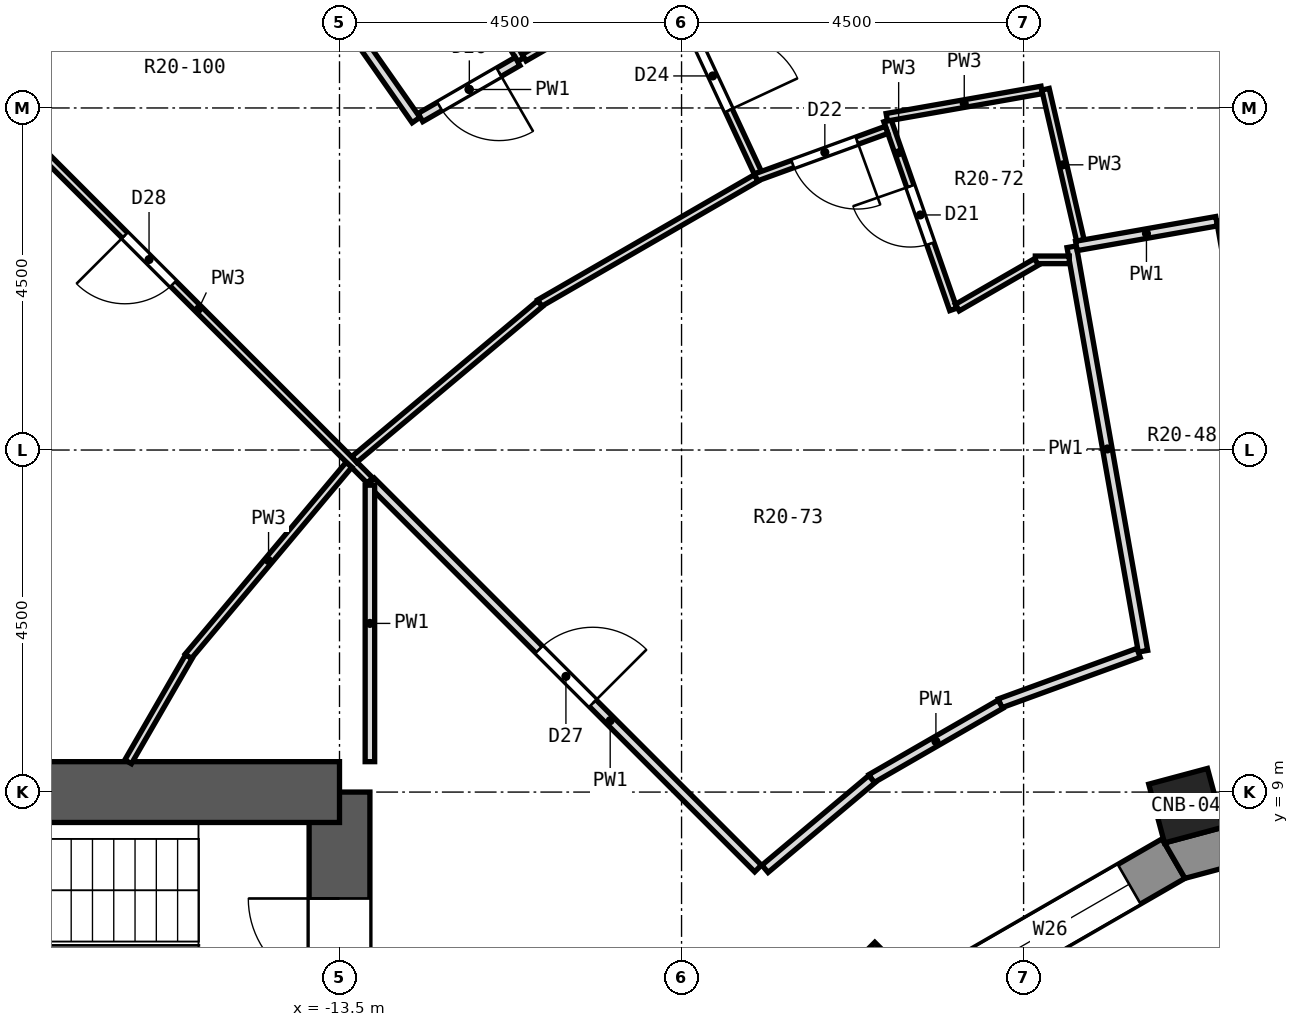
"""IFC4 building model, lengths in metres.
Left out: names, types, materials, properties, quantities, classifications, styles, units other than length and angle.
Written with IfcOpenShell. Run it as: python <this file> out.ifc"""

import sys

from ifc_helpers import new_model, si_unit, direction, frame, frame_2d, origin, origin_2d, place, context, subcontext, project, spatial, polyline, rectangle, outline, extrude, element, fill, save


model = new_model("IFC4")
c1 = context("Model", 3, precision=1e-05, world=origin(), true_north=direction((0.0, 1.0)))
c2 = subcontext(c1, "Body", "Model", "MODEL_VIEW")
j1 = project(units=[si_unit("LENGTHUNIT", "METRE"), si_unit("PLANEANGLEUNIT", "RADIAN")], contexts=[c1])
p1 = place(None, origin())
s1 = spatial("IfcSite", under=j1, at=p1, CompositionType="ELEMENT")
p2 = place(p1, origin())
s2 = spatial("IfcBuilding", under=s1, at=p2, CompositionType="ELEMENT")
p3 = place(p2, frame((0.0, 0.0, 121.6)))
s3 = spatial("IfcBuildingStorey", under=s2, at=p3, CompositionType="ELEMENT", Elevation=121.6)
for number, where, z_axis, x_axis in (
    (1, (-2.364, 8.821, 0.0), (0.0, 0.0, 1.0), (-0.259, 0.966, 0.0)),
    (2, (-6.458, 6.458, 0.0), (0.0, 0.0, 1.0), (-0.707, 0.707, 0.0)),
):
    element("IfcColumn", number, at=place(p3, frame(where, z_axis=z_axis, x_axis=x_axis)), inside=s3, PredefinedType="COLUMN", context=c2, shape_type="SweptSolid", body=[
        extrude(rectangle(XDim=0.8, YDim=0.8, at=origin_2d()), origin(), (0.0, 0.0, 1.0), 3.3),
    ])
p4 = place(p3, frame((-13.5, -9.0, 0.0), z_axis=(0.0, 0.0, 1.0), x_axis=(0.0, 1.0, 0.0)))
e3 = element("IfcWall", 3, at=p4, inside=s3, PredefinedType="SHEAR", context=c2, shape_type="SweptSolid", body=[
    extrude(rectangle(XDim=18.0, YDim=0.8, at=frame_2d((9.0, 0.0))), origin(), (0.0, 0.0, 1.0), 3.3),
])
p5 = place(p4, frame((15.4, 0.0, 0.0)))
e4 = element("IfcOpeningElement", 4, at=p5, cuts=e3, PredefinedType="OPENING", context=c2, shape_type="SweptSolid", body=[
    extrude(rectangle(XDim=1.2, YDim=2.1, at=frame_2d((0.6, 1.05))), frame((0.0, 0.412, 0.0), z_axis=(0.0, -1.0, 0.0), x_axis=(1.0, 0.0, 0.0)), (0.0, 0.0, 1.0), 0.824),
])
p6 = place(p4, frame((1.4, 0.0, 0.0)))
e5 = element("IfcOpeningElement", 5, at=p6, cuts=e3, PredefinedType="OPENING", context=c2, shape_type="SweptSolid", body=[
    extrude(rectangle(XDim=1.2, YDim=2.1, at=frame_2d((0.6, 1.05))), frame((0.0, 0.412, 0.0), z_axis=(0.0, -1.0, 0.0), x_axis=(1.0, 0.0, 0.0)), (0.0, 0.0, 1.0), 0.824),
])
p7 = place(p4, frame((7.5, 0.0, 0.0)))
e6 = element("IfcOpeningElement", 6, at=p7, cuts=e3, PredefinedType="OPENING", context=c2, shape_type="SweptSolid", body=[
    extrude(rectangle(XDim=3.0, YDim=2.4, at=frame_2d((1.5, 1.2))), frame((0.0, 0.412, 0.0), z_axis=(0.0, -1.0, 0.0), x_axis=(1.0, 0.0, 0.0)), (0.0, 0.0, 1.0), 0.824),
])
p8 = place(p3, frame((-13.5, 9.0, 0.0), z_axis=(0.0, 0.0, 1.0), x_axis=(-1.0, 0.0, 0.0)))
e7 = element("IfcWall", 7, at=p8, inside=s3, PredefinedType="SHEAR", context=c2, shape_type="SweptSolid", body=[
    extrude(rectangle(XDim=10.4, YDim=0.8, at=frame_2d((5.2, 0.0))), origin(), (0.0, 0.0, 1.0), 3.3),
])
p9 = place(p3, frame((-2.527, 8.125, 0.0), z_axis=(0.0, 0.0, 1.0), x_axis=(-0.86604563398, -0.499964958637, 0.0)))
e8 = element("IfcWall", 8, at=p9, inside=s3, PredefinedType="SOLIDWALL", context=c2, shape_type="SweptSolid", body=[
    extrude(rectangle(XDim=3.747, YDim=0.6, at=frame_2d((1.874, 0.0))), origin(), (0.0, 0.0, 1.0), 2.8),
])
p10 = place(p9, frame((0.674, 0.0, 0.9)))
e9 = element("IfcOpeningElement", 9, at=p10, cuts=e8, PredefinedType="OPENING", context=c2, shape_type="SweptSolid", body=[
    extrude(rectangle(XDim=2.4, YDim=1.8, at=frame_2d((1.2, 0.9))), frame((0.0, 0.312, 0.0), z_axis=(0.0, -1.0, 0.0), x_axis=(1.0, 0.0, 0.0)), (0.0, 0.0, 1.0), 0.624),
])
p11 = place(p3, origin())
e10 = element("IfcWall", 10, at=p11, inside=s3, PredefinedType="SOLIDWALL", context=c2, shape_type="SweptSolid", body=[
    extrude(outline(polyline([(-2.646, 8.331), (-2.377, 7.865), (-1.874, 8.0), (-1.874, 8.538), (-2.646, 8.331)])), origin(), (0.0, 0.0, 1.0), 2.8),
])
p12 = place(p3, frame((-3.867, 16.174, 0.0), z_axis=(0.0, 0.0, 1.0), x_axis=(0.173602314867, -0.98481583876, 0.0)))
e11 = element("IfcWall", 11, at=p12, inside=s3, PredefinedType="PARTITIONING", context=c2, shape_type="SweptSolid", body=[
    extrude(rectangle(XDim=5.403, YDim=0.125, at=frame_2d((2.702, 0.0))), origin(), (0.0, 0.0, 1.0), 2.8),
])
p13 = place(p3, frame((-1.898, 16.521, 0.0), z_axis=(0.0, 0.0, 1.0), x_axis=(0.173777601074, -0.984784923405, 0.0)))
e12 = element("IfcWall", 12, at=p13, inside=s3, PredefinedType="PARTITIONING", context=c2, shape_type="SweptSolid", body=[
    extrude(rectangle(XDim=5.403, YDim=0.125, at=frame_2d((2.702, 0.0))), origin(), (0.0, 0.0, 1.0), 2.8),
])
p14 = place(p3, frame((-4.212, 18.246, 0.0), z_axis=(0.0, 0.0, 1.0), x_axis=(0.224815815327, -0.974401277287, 0.0)))
e13 = element("IfcWall", 13, at=p14, inside=s3, PredefinedType="PARTITIONING", context=c2, shape_type="SweptSolid", body=[
    extrude(rectangle(XDim=2.041, YDim=0.1, at=frame_2d((1.02, 0.0))), origin(), (0.0, 0.0, 1.0), 2.8),
])
p15 = place(p3, frame((-6.292, 17.835, 0.0), z_axis=(0.0, 0.0, 1.0), x_axis=(0.329581778564, -0.944127031304, 0.0)))
e14 = element("IfcWall", 14, at=p15, inside=s3, PredefinedType="PARTITIONING", context=c2, shape_type="SweptSolid", body=[
    extrude(rectangle(XDim=2.632, YDim=0.1, at=frame_2d((1.316, 0.0))), origin(), (0.0, 0.0, 1.0), 2.8),
])
p16 = place(p15, frame((0.916, 0.0, 0.0)))
e15 = element("IfcOpeningElement", 15, at=p16, cuts=e14, PredefinedType="OPENING", context=c2, shape_type="SweptSolid", body=[
    extrude(rectangle(XDim=0.8, YDim=2.1, at=frame_2d((0.4, 1.05))), frame((0.0, 0.062, 0.0), z_axis=(0.0, -1.0, 0.0), x_axis=(1.0, 0.0, 0.0)), (0.0, 0.0, 1.0), 0.124),
])
p17 = place(p3, frame((-10.846, 23.26, 0.0), z_axis=(0.0, 0.0, 1.0), x_axis=(0.422617898312, -0.906307956506, 0.0)))
e16 = element("IfcWall", 16, at=p17, inside=s3, PredefinedType="PARTITIONING", context=c2, shape_type="SweptSolid", body=[
    extrude(rectangle(XDim=6.744, YDim=0.1, at=frame_2d((3.372, 0.0))), origin(), (0.0, 0.0, 1.0), 2.8),
])
p18 = place(p17, frame((4.839, 0.0, 0.0)))
e17 = element("IfcOpeningElement", 17, at=p18, cuts=e16, PredefinedType="OPENING", context=c2, shape_type="SweptSolid", body=[
    extrude(rectangle(XDim=1.0, YDim=2.1, at=frame_2d((0.5, 1.05))), frame((0.0, 0.062, 0.0), z_axis=(0.0, -1.0, 0.0), x_axis=(1.0, 0.0, 0.0)), (0.0, 0.0, 1.0), 0.124),
])
p19 = place(p3, frame((-12.292, 20.613, 0.0), z_axis=(0.0, 0.0, 1.0), x_axis=(0.512043462342, -0.858959540766, 0.0)))
e18 = element("IfcWall", 18, at=p19, inside=s3, PredefinedType="PARTITIONING", context=c2, shape_type="SweptSolid", body=[
    extrude(rectangle(XDim=2.301, YDim=0.1, at=frame_2d((1.15, 0.0))), origin(), (0.0, 0.0, 1.0), 2.8),
])
p20 = place(p3, frame((-14.721, 21.024, 0.0), z_axis=(0.0, 0.0, 1.0), x_axis=(0.573453908861, -0.819237825306, 0.0)))
e19 = element("IfcWall", 19, at=p20, inside=s3, PredefinedType="PARTITIONING", context=c2, shape_type="SweptSolid", body=[
    extrude(rectangle(XDim=3.885, YDim=0.125, at=frame_2d((1.942, 0.0))), origin(), (0.0, 0.0, 1.0), 2.8),
])
p21 = place(p3, frame((-18.148, 18.148, 0.0), z_axis=(0.0, 0.0, 1.0), x_axis=(0.707106781187, -0.707106781187, 0.0)))
e20 = element("IfcWall", 20, at=p21, inside=s3, PredefinedType="PARTITIONING", context=c2, shape_type="SweptSolid", body=[
    extrude(rectangle(XDim=7.139, YDim=0.1, at=frame_2d((3.569, 0.0))), origin(), (0.0, 0.0, 1.0), 2.8),
])
p22 = place(p21, frame((2.58, 0.0, 0.0)))
e21 = element("IfcOpeningElement", 21, at=p22, cuts=e20, PredefinedType="OPENING", context=c2, shape_type="SweptSolid", body=[
    extrude(rectangle(XDim=0.9, YDim=2.1, at=frame_2d((0.45, 1.05))), frame((0.0, 0.062, 0.0), z_axis=(0.0, -1.0, 0.0), x_axis=(1.0, 0.0, 0.0)), (0.0, 0.0, 1.0), 0.124),
])
p23 = place(p3, frame((-13.086, 13.086, 0.0), z_axis=(0.0, 0.0, 1.0), x_axis=(0.707208486583, -0.707005061159, 0.0)))
e22 = element("IfcWall", 22, at=p23, inside=s3, PredefinedType="PARTITIONING", context=c2, shape_type="SweptSolid", body=[
    extrude(rectangle(XDim=7.201, YDim=0.125, at=frame_2d((3.601, 0.0))), origin(), (0.0, 0.0, 1.0), 2.8),
])
p24 = place(p23, frame((3.126, 0.0, 0.0)))
e23 = element("IfcOpeningElement", 23, at=p24, cuts=e22, PredefinedType="OPENING", context=c2, shape_type="SweptSolid", body=[
    extrude(rectangle(XDim=1.0, YDim=2.1, at=frame_2d((0.5, 1.05))), frame((0.0, 0.074, 0.0), z_axis=(0.0, -1.0, 0.0), x_axis=(1.0, 0.0, 0.0)), (0.0, 0.0, 1.0), 0.149),
])
p25 = place(p3, frame((-4.346, 16.002, 0.0), z_axis=(0.0, 0.0, 1.0), x_axis=(1.0, 0.0, 0.0)))
e24 = element("IfcWall", 24, at=p25, inside=s3, PredefinedType="PARTITIONING", context=c2, shape_type="SweptSolid", body=[
    extrude(rectangle(XDim=0.447, YDim=0.1, at=frame_2d((0.223, 0.0))), origin(), (0.0, 0.0, 1.0), 2.8),
])
p26 = place(p3, frame((-3.805, 16.185, 0.0), z_axis=(0.0, 0.0, 1.0), x_axis=(0.984829460828, 0.173525021494, 0.0)))
e25 = element("IfcWall", 25, at=p26, inside=s3, PredefinedType="PARTITIONING", context=c2, shape_type="SweptSolid", body=[
    extrude(rectangle(XDim=1.873, YDim=0.125, at=frame_2d((0.936, 0.0))), origin(), (0.0, 0.0, 1.0), 2.8),
])
p27 = place(p3, frame((-6.3, 17.878, 0.0), z_axis=(0.0, 0.0, 1.0), x_axis=(0.984823916484, 0.173556485102, 0.0)))
e26 = element("IfcWall", 26, at=p27, inside=s3, PredefinedType="PARTITIONING", context=c2, shape_type="SweptSolid", body=[
    extrude(rectangle(XDim=2.069, YDim=0.1, at=frame_2d((1.035, 0.0))), origin(), (0.0, 0.0, 1.0), 2.8),
])
p28 = place(p3, frame((-4.811, 10.167, 0.0), z_axis=(0.0, 0.0, 1.0), x_axis=(0.939506513074, 0.34253103785, 0.0)))
e27 = element("IfcWall", 27, at=p28, inside=s3, PredefinedType="PARTITIONING", context=c2, shape_type="SweptSolid", body=[
    extrude(rectangle(XDim=1.94, YDim=0.125, at=frame_2d((0.97, 0.0))), origin(), (0.0, 0.0, 1.0), 2.8),
])
p29 = place(p3, frame((-8.023, 17.086, 0.0), z_axis=(0.0, 0.0, 1.0), x_axis=(0.93970385633, 0.341989272345, 0.0)))
e28 = element("IfcWall", 28, at=p29, inside=s3, PredefinedType="PARTITIONING", context=c2, shape_type="SweptSolid", body=[
    extrude(rectangle(XDim=1.831, YDim=0.1, at=frame_2d((0.916, 0.0))), origin(), (0.0, 0.0, 1.0), 2.8),
])
p30 = place(p29, frame((0.516, 0.0, 0.0)))
e29 = element("IfcOpeningElement", 29, at=p30, cuts=e28, PredefinedType="OPENING", context=c2, shape_type="SweptSolid", body=[
    extrude(rectangle(XDim=0.9, YDim=2.1, at=frame_2d((0.45, 1.05))), frame((0.0, 0.062, 0.0), z_axis=(0.0, -1.0, 0.0), x_axis=(1.0, 0.0, 0.0)), (0.0, 0.0, 1.0), 0.124),
])
p31 = place(p3, frame((-6.502, 9.177, 0.0), z_axis=(0.0, 0.0, 1.0), x_axis=(0.866328596722, 0.499474486338, 0.0)))
e30 = element("IfcWall", 30, at=p31, inside=s3, PredefinedType="PARTITIONING", context=c2, shape_type="SweptSolid", body=[
    extrude(rectangle(XDim=1.96, YDim=0.125, at=frame_2d((0.98, 0.0))), origin(), (0.0, 0.0, 1.0), 2.8),
])
p32 = place(p3, frame((-5.372, 15.374, 0.0), z_axis=(0.0, 0.0, 1.0), x_axis=(0.866111216017, 0.499851339389, 0.0)))
e31 = element("IfcWall", 31, at=p32, inside=s3, PredefinedType="PARTITIONING", context=c2, shape_type="SweptSolid", body=[
    extrude(rectangle(XDim=1.202, YDim=0.1, at=frame_2d((0.601, 0.0))), origin(), (0.0, 0.0, 1.0), 2.8),
])
p33 = place(p3, frame((-10.868, 15.433, 0.0), z_axis=(0.0, 0.0, 1.0), x_axis=(0.866020017222, 0.500009329683, 0.0)))
e32 = element("IfcWall", 32, at=p33, inside=s3, PredefinedType="PARTITIONING", context=c2, shape_type="SweptSolid", body=[
    extrude(rectangle(XDim=3.291, YDim=0.1, at=frame_2d((1.645, 0.0))), origin(), (0.0, 0.0, 1.0), 2.8),
])
p34 = place(p3, frame((-11.071, 18.662, 0.0), z_axis=(0.0, 0.0, 1.0), x_axis=(0.865870655861, 0.50026793553, 0.0)))
e33 = element("IfcWall", 33, at=p34, inside=s3, PredefinedType="PARTITIONING", context=c2, shape_type="SweptSolid", body=[
    extrude(rectangle(XDim=2.105, YDim=0.1, at=frame_2d((1.052, 0.0))), origin(), (0.0, 0.0, 1.0), 2.8),
])
p35 = place(p3, frame((-12.435, 17.874, 0.0), z_axis=(0.0, 0.0, 1.0), x_axis=(0.866056109487, 0.499946812391, 0.0)))
e34 = element("IfcWall", 34, at=p35, inside=s3, PredefinedType="PARTITIONING", context=c2, shape_type="SweptSolid", body=[
    extrude(rectangle(XDim=1.476, YDim=0.125, at=frame_2d((0.738, 0.0))), origin(), (0.0, 0.0, 1.0), 2.8),
])
p36 = place(p35, frame((0.293, 0.0, 0.0)))
e35 = element("IfcOpeningElement", 35, at=p36, cuts=e34, PredefinedType="OPENING", context=c2, shape_type="SweptSolid", body=[
    extrude(rectangle(XDim=0.9, YDim=2.1, at=frame_2d((0.45, 1.05))), frame((0.0, 0.074, 0.0), z_axis=(0.0, -1.0, 0.0), x_axis=(1.0, 0.0, 0.0)), (0.0, 0.0, 1.0), 0.149),
])
p37 = place(p3, frame((-7.902, 7.99, 0.0), z_axis=(0.0, 0.0, 1.0), x_axis=(0.765904046375, 0.642954890911, 0.0)))
e36 = element("IfcWall", 36, at=p37, inside=s3, PredefinedType="PARTITIONING", context=c2, shape_type="SweptSolid", body=[
    extrude(rectangle(XDim=1.835, YDim=0.125, at=frame_2d((0.917, 0.0))), origin(), (0.0, 0.0, 1.0), 2.8),
])
p38 = place(p3, frame((-13.306, 13.376, 0.0), z_axis=(0.0, 0.0, 1.0), x_axis=(0.766146553843, 0.642665899232, 0.0)))
e37 = element("IfcWall", 37, at=p38, inside=s3, PredefinedType="PARTITIONING", context=c2, shape_type="SweptSolid", body=[
    extrude(rectangle(XDim=3.189, YDim=0.1, at=frame_2d((1.595, 0.0))), origin(), (0.0, 0.0, 1.0), 2.8),
])
p39 = place(p3, frame((-15.491, 10.785, 0.0), z_axis=(0.0, 0.0, 1.0), x_axis=(0.642706409745, 0.766112570627, 0.0)))
e38 = element("IfcWall", 38, at=p39, inside=s3, PredefinedType="PARTITIONING", context=c2, shape_type="SweptSolid", body=[
    extrude(rectangle(XDim=3.29, YDim=0.1, at=frame_2d((1.645, 0.0))), origin(), (0.0, 0.0, 1.0), 2.8),
])
p40 = place(p3, frame((-16.281, 9.398, 0.0), z_axis=(0.0, 0.0, 1.0), x_axis=(0.499872473806, 0.866099018549, 0.0)))
e39 = element("IfcWall", 39, at=p40, inside=s3, PredefinedType="PARTITIONING", context=c2, shape_type="SweptSolid", body=[
    extrude(rectangle(XDim=1.597, YDim=0.1, at=frame_2d((0.798, 0.0))), origin(), (0.0, 0.0, 1.0), 2.8),
])
p41 = place(p3, frame((-13.1, 9.4, 0.0), z_axis=(0.0, 0.0, 1.0), x_axis=(0.0, 1.0, 0.0)))
e40 = element("IfcWall", 40, at=p41, inside=s3, PredefinedType="PARTITIONING", context=c2, shape_type="SweptSolid", body=[
    extrude(rectangle(XDim=3.638, YDim=0.125, at=frame_2d((1.819, 0.0))), origin(), (0.0, 0.0, 1.0), 2.8),
])
p42 = place(p10, origin())
e41 = element("IfcWindow", 41, at=p42, inside=s3, PartitioningType="SINGLE_PANEL", PredefinedType="WINDOW", context=c2, shape_type="SweptSolid", body=[
    extrude(rectangle(XDim=2.4, YDim=1.8, at=frame_2d((1.2, 0.9))), frame((0.0, -0.12, 0.0), z_axis=(0.0, -1.0, 0.0), x_axis=(1.0, 0.0, 0.0)), (0.0, 0.0, 1.0), 0.06),
])
fill(e9, e41)
p43 = place(p16, frame((0.8, 0.0, 0.0), z_axis=(0.0, 0.0, 1.0), x_axis=(-1.0, 0.0, 0.0)))
e42 = element("IfcDoor", 42, at=p43, inside=s3, OperationType="SINGLE_SWING_RIGHT", PredefinedType="DOOR", context=c2, shape_type="SweptSolid", body=[
    extrude(rectangle(XDim=0.8, YDim=2.1, at=frame_2d((0.4, 1.05))), frame((0.0, 0.025, 0.0), z_axis=(0.0, -1.0, 0.0), x_axis=(1.0, 0.0, 0.0)), (0.0, 0.0, 1.0), 0.05),
])
fill(e15, e42)
p44 = place(p30, frame((0.9, 0.0, 0.0), z_axis=(0.0, 0.0, 1.0), x_axis=(-1.0, 0.0, 0.0)))
e43 = element("IfcDoor", 43, at=p44, inside=s3, OperationType="SINGLE_SWING_LEFT", PredefinedType="DOOR", context=c2, shape_type="SweptSolid", body=[
    extrude(rectangle(XDim=0.9, YDim=2.1, at=frame_2d((0.45, 1.05))), frame((0.0, 0.025, 0.0), z_axis=(0.0, -1.0, 0.0), x_axis=(1.0, 0.0, 0.0)), (0.0, 0.0, 1.0), 0.05),
])
fill(e29, e43)
p45 = place(p18, origin())
e44 = element("IfcDoor", 44, at=p45, inside=s3, OperationType="SINGLE_SWING_RIGHT", PredefinedType="DOOR", context=c2, shape_type="SweptSolid", body=[
    extrude(rectangle(XDim=1.0, YDim=2.1, at=frame_2d((0.5, 1.05))), frame((0.0, 0.025, 0.0), z_axis=(0.0, -1.0, 0.0), x_axis=(1.0, 0.0, 0.0)), (0.0, 0.0, 1.0), 0.05),
])
fill(e17, e44)
p46 = place(p36, frame((0.9, 0.0, 0.0), z_axis=(0.0, 0.0, 1.0), x_axis=(-1.0, 0.0, 0.0)))
e45 = element("IfcDoor", 45, at=p46, inside=s3, OperationType="SINGLE_SWING_LEFT", PredefinedType="DOOR", context=c2, shape_type="SweptSolid", body=[
    extrude(rectangle(XDim=0.9, YDim=2.1, at=frame_2d((0.45, 1.05))), frame((0.0, 0.025, 0.0), z_axis=(0.0, -1.0, 0.0), x_axis=(1.0, 0.0, 0.0)), (0.0, 0.0, 1.0), 0.05),
])
fill(e35, e45)
p47 = place(p24, origin())
e46 = element("IfcDoor", 46, at=p47, inside=s3, OperationType="SINGLE_SWING_RIGHT", PredefinedType="DOOR", context=c2, shape_type="SweptSolid", body=[
    extrude(rectangle(XDim=1.0, YDim=2.1, at=frame_2d((0.5, 1.05))), frame((0.0, 0.025, 0.0), z_axis=(0.0, -1.0, 0.0), x_axis=(1.0, 0.0, 0.0)), (0.0, 0.0, 1.0), 0.05),
])
fill(e23, e46)
p48 = place(p22, frame((0.9, 0.0, 0.0), z_axis=(0.0, 0.0, 1.0), x_axis=(-1.0, 0.0, 0.0)))
e47 = element("IfcDoor", 47, at=p48, inside=s3, OperationType="SINGLE_SWING_RIGHT", PredefinedType="DOOR", context=c2, shape_type="SweptSolid", body=[
    extrude(rectangle(XDim=0.9, YDim=2.1, at=frame_2d((0.45, 1.05))), frame((0.0, 0.025, 0.0), z_axis=(0.0, -1.0, 0.0), x_axis=(1.0, 0.0, 0.0)), (0.0, 0.0, 1.0), 0.05),
])
fill(e21, e47)
p49 = place(p5, origin())
e48 = element("IfcDoor", 48, at=p49, inside=s3, OperationType="SINGLE_SWING_RIGHT", PredefinedType="DOOR", context=c2, shape_type="SweptSolid", body=[
    extrude(rectangle(XDim=1.2, YDim=2.1, at=frame_2d((0.6, 1.05))), frame((0.0, 0.025, 0.0), z_axis=(0.0, -1.0, 0.0), x_axis=(1.0, 0.0, 0.0)), (0.0, 0.0, 1.0), 0.05),
])
fill(e4, e48)
save(model, sys.argv[1])
